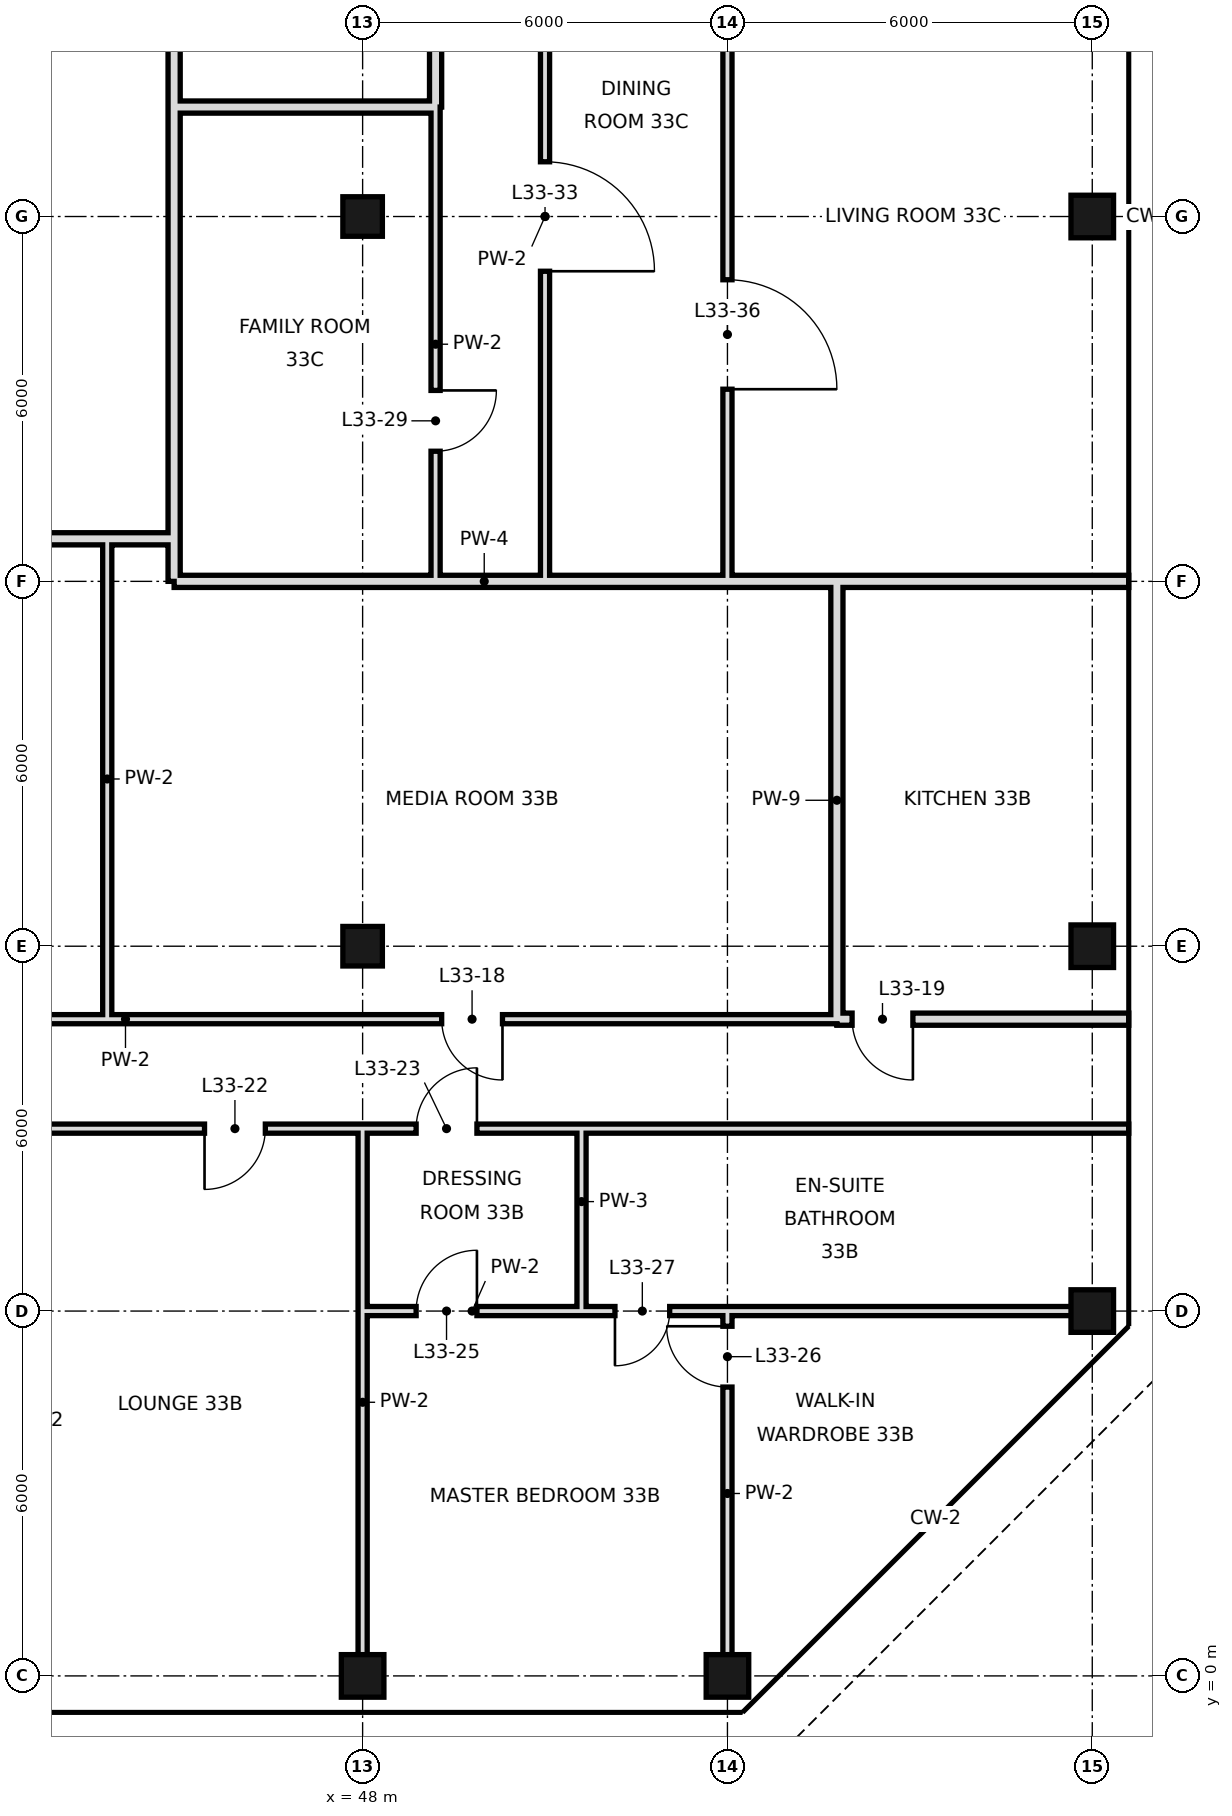
"""IFC4 building model, lengths in metres.
Left out: names, types, materials, properties, quantities, classifications, styles, units other than length and angle.
Written with IfcOpenShell. Run it as: python <this file> out.ifc"""

import sys

from ifc_helpers import new_model, si_unit, direction, frame, frame_2d, origin, origin_2d, place, context, subcontext, project, spatial, rectangle, hollow_rectangle, extrude, element, fill, save


model = new_model("IFC4")
c1 = context("Model", 3, precision=1e-05, world=origin(), true_north=direction((0.0, 1.0)))
c2 = subcontext(c1, "Body", "Model", "MODEL_VIEW")
j1 = project(units=[si_unit("LENGTHUNIT", "METRE"), si_unit("PLANEANGLEUNIT", "RADIAN")], contexts=[c1])
p1 = place(None, origin())
s1 = spatial("IfcSite", under=j1, at=p1, CompositionType="ELEMENT")
p2 = place(p1, origin())
s2 = spatial("IfcBuilding", under=s1, at=p2, CompositionType="ELEMENT")
p3 = place(p2, frame((0.0, 0.0, 147.4)))
s3 = spatial("IfcBuildingStorey", under=s2, at=p3, CompositionType="ELEMENT", Elevation=147.4)
p4 = place(p3, frame((48.0, 0.0, 0.0), z_axis=(0.0, 0.0, 1.0), x_axis=(1.0, 0.0, 0.0)))
e1 = element("IfcColumn", 1, at=p4, inside=s3, PredefinedType="COLUMN", context=c2, shape_type="SweptSolid", body=[
    extrude(hollow_rectangle(XDim=0.7, YDim=0.7, WallThickness=0.036, at=origin_2d()), origin(), (0.0, 0.0, 1.0), 3.6),
])
for number, where, z_axis, x_axis in (
    (2, (48.0, 12.0, 0.0), (0.0, 0.0, 1.0), (1.0, 0.0, 0.0)),
    (3, (48.0, 24.0, 0.0), (0.0, 0.0, 1.0), (1.0, 0.0, 0.0)),
):
    element("IfcColumn", number, at=place(p3, frame(where, z_axis=z_axis, x_axis=x_axis)), inside=s3, PredefinedType="COLUMN", context=c2, shape_type="SweptSolid", body=[
        extrude(hollow_rectangle(XDim=0.65, YDim=0.65, WallThickness=0.032, at=origin_2d()), origin(), (0.0, 0.0, 1.0), 3.6),
    ])
for number, where, z_axis, x_axis in (
    (4, (54.0, 0.0, 0.0), (0.0, 0.0, 1.0), (1.0, 0.0, 0.0)),
    (5, (60.0, 6.0, 0.0), (0.0, 0.0, 1.0), (1.0, 0.0, 0.0)),
    (6, (60.0, 12.0, 0.0), (0.0, 0.0, 1.0), (1.0, 0.0, 0.0)),
    (7, (60.0, 24.0, 0.0), (0.0, 0.0, 1.0), (1.0, 0.0, 0.0)),
):
    element("IfcColumn", number, at=place(p3, frame(where, z_axis=z_axis, x_axis=x_axis)), inside=s3, PredefinedType="COLUMN", context=c2, shape_type="SweptSolid", body=[
        extrude(hollow_rectangle(XDim=0.7, YDim=0.7, WallThickness=0.036, at=origin_2d()), origin(), (0.0, 0.0, 1.0), 3.6),
    ])
p5 = place(p3, frame((43.8, 10.8, 0.0), z_axis=(0.0, 0.0, 1.0), x_axis=(0.0, 1.0, 0.0)))
e8 = element("IfcWall", 8, at=p5, inside=s3, PredefinedType="PARTITIONING", context=c2, shape_type="SweptSolid", body=[
    extrude(rectangle(XDim=7.9, YDim=0.15, at=frame_2d((3.95, 0.0))), origin(), (0.0, 0.0, 1.0), 3.42),
])
p6 = place(p3, frame((44.9, 18.7, 0.0), z_axis=(0.0, 0.0, 1.0), x_axis=(0.0, 1.0, 0.0)))
e9 = element("IfcWall", 9, at=p6, inside=s3, PredefinedType="SOLIDWALL", context=c2, shape_type="SweptSolid", body=[
    extrude(rectangle(XDim=7.1, YDim=0.2, at=frame_2d((3.55, 0.0))), origin(), (0.0, 0.0, 1.0), 3.42),
])
p7 = place(p3, frame((44.9, 25.8, 0.0), z_axis=(0.0, 0.0, 1.0), x_axis=(0.0, 1.0, 0.0)))
e10 = element("IfcWall", 10, at=p7, inside=s3, PredefinedType="SOLIDWALL", context=c2, shape_type="SweptSolid", body=[
    extrude(rectangle(XDim=4.8, YDim=0.2, at=frame_2d((2.4, 0.0))), origin(), (0.0, 0.0, 1.0), 2.97),
])
p8 = place(p3, frame((44.9, 18.0, 0.0), z_axis=(0.0, 0.0, 1.0), x_axis=(0.0, 1.0, 0.0)))
e11 = element("IfcWall", 11, at=p8, inside=s3, PredefinedType="SOLIDWALL", context=c2, shape_type="SweptSolid", body=[
    extrude(rectangle(XDim=0.7, YDim=0.2, at=frame_2d((0.35, 0.0))), origin(), (0.0, 0.0, 1.0), 2.97),
])
p9 = place(p3, frame((48.0, 0.0, 0.0), z_axis=(0.0, 0.0, 1.0), x_axis=(0.0, 1.0, 0.0)))
e12 = element("IfcWall", 12, at=p9, inside=s3, PredefinedType="PARTITIONING", context=c2, shape_type="SweptSolid", body=[
    extrude(rectangle(XDim=9.0, YDim=0.15, at=frame_2d((4.5, 0.0))), origin(), (0.0, 0.0, 1.0), 2.72),
])
p10 = place(p3, frame((49.2, 25.8, 0.0), z_axis=(0.0, 0.0, 1.0), x_axis=(0.0, 1.0, 0.0)))
e13 = element("IfcWall", 13, at=p10, inside=s3, PredefinedType="SOLIDWALL", context=c2, shape_type="SweptSolid", body=[
    extrude(rectangle(XDim=4.8, YDim=0.2, at=frame_2d((2.4, 0.0))), origin(), (0.0, 0.0, 1.0), 2.72),
])
p11 = place(p10, frame((2.56, 0.0, 0.0)))
e14 = element("IfcOpeningElement", 14, at=p11, cuts=e13, PredefinedType="OPENING", context=c2, shape_type="SweptSolid", body=[
    extrude(rectangle(XDim=1.0, YDim=2.4, at=frame_2d((0.5, 1.2))), frame((0.0, 0.11, 0.0), z_axis=(0.0, -1.0, 0.0), x_axis=(1.0, 0.0, 0.0)), (0.0, 0.0, 1.0), 0.22),
])
p12 = place(p3, frame((49.2, 18.0, 0.0), z_axis=(0.0, 0.0, 1.0), x_axis=(0.0, 1.0, 0.0)))
e15 = element("IfcWall", 15, at=p12, inside=s3, PredefinedType="PARTITIONING", context=c2, shape_type="SweptSolid", body=[
    extrude(rectangle(XDim=7.8, YDim=0.15, at=frame_2d((3.9, 0.0))), origin(), (0.0, 0.0, 1.0), 3.42),
])
p13 = place(p12, frame((2.14, 0.0, 0.0)))
e16 = element("IfcOpeningElement", 16, at=p13, cuts=e15, PredefinedType="OPENING", context=c2, shape_type="SweptSolid", body=[
    extrude(rectangle(XDim=1.0, YDim=2.4, at=frame_2d((0.5, 1.2))), frame((0.0, 0.085, 0.0), z_axis=(0.0, -1.0, 0.0), x_axis=(1.0, 0.0, 0.0)), (0.0, 0.0, 1.0), 0.17),
])
p14 = place(p3, frame((51.0, 18.0, 0.0), z_axis=(0.0, 0.0, 1.0), x_axis=(0.0, 1.0, 0.0)))
e17 = element("IfcWall", 17, at=p14, inside=s3, PredefinedType="PARTITIONING", context=c2, shape_type="SweptSolid", body=[
    extrude(rectangle(XDim=12.0, YDim=0.15, at=frame_2d((6.0, 0.0))), origin(), (0.0, 0.0, 1.0), 3.42),
])
p15 = place(p14, frame((5.1, 0.0, 0.0)))
e18 = element("IfcOpeningElement", 18, at=p15, cuts=e17, PredefinedType="OPENING", context=c2, shape_type="SweptSolid", body=[
    extrude(rectangle(XDim=1.8, YDim=2.4, at=frame_2d((0.9, 1.2))), frame((0.0, 0.085, 0.0), z_axis=(0.0, -1.0, 0.0), x_axis=(1.0, 0.0, 0.0)), (0.0, 0.0, 1.0), 0.17),
])
p16 = place(p3, frame((51.6, 6.0, 0.0), z_axis=(0.0, 0.0, 1.0), x_axis=(0.0, 1.0, 0.0)))
e19 = element("IfcWall", 19, at=p16, inside=s3, PredefinedType="PARTITIONING", context=c2, shape_type="SweptSolid", body=[
    extrude(rectangle(XDim=3.0, YDim=0.15, at=frame_2d((1.5, 0.0))), origin(), (0.0, 0.0, 1.0), 3.42),
])
p17 = place(p3, frame((54.0, 0.0, 0.0), z_axis=(0.0, 0.0, 1.0), x_axis=(0.0, 1.0, 0.0)))
e20 = element("IfcWall", 20, at=p17, inside=s3, PredefinedType="PARTITIONING", context=c2, shape_type="SweptSolid", body=[
    extrude(rectangle(XDim=6.0, YDim=0.15, at=frame_2d((3.0, 0.0))), origin(), (0.0, 0.0, 1.0), 3.42),
])
p18 = place(p17, frame((4.75, 0.0, 0.0)))
e21 = element("IfcOpeningElement", 21, at=p18, cuts=e20, PredefinedType="OPENING", context=c2, shape_type="SweptSolid", body=[
    extrude(rectangle(XDim=1.0, YDim=2.4, at=frame_2d((0.5, 1.2))), frame((0.0, 0.085, 0.0), z_axis=(0.0, -1.0, 0.0), x_axis=(1.0, 0.0, 0.0)), (0.0, 0.0, 1.0), 0.17),
])
p19 = place(p3, frame((54.0, 18.0, 0.0), z_axis=(0.0, 0.0, 1.0), x_axis=(0.0, 1.0, 0.0)))
e22 = element("IfcWall", 22, at=p19, inside=s3, PredefinedType="PARTITIONING", context=c2, shape_type="SweptSolid", body=[
    extrude(rectangle(XDim=12.0, YDim=0.15, at=frame_2d((6.0, 0.0))), origin(), (0.0, 0.0, 1.0), 3.42),
])
p20 = place(p19, frame((3.16, 0.0, 0.0)))
e23 = element("IfcOpeningElement", 23, at=p20, cuts=e22, PredefinedType="OPENING", context=c2, shape_type="SweptSolid", body=[
    extrude(rectangle(XDim=1.8, YDim=2.4, at=frame_2d((0.9, 1.2))), frame((0.0, 0.085, 0.0), z_axis=(0.0, -1.0, 0.0), x_axis=(1.0, 0.0, 0.0)), (0.0, 0.0, 1.0), 0.17),
])
p21 = place(p3, frame((55.8, 10.8, 0.0), z_axis=(0.0, 0.0, 1.0), x_axis=(0.0, 1.0, 0.0)))
e24 = element("IfcWall", 24, at=p21, inside=s3, PredefinedType="SOLIDWALL", context=c2, shape_type="SweptSolid", body=[
    extrude(rectangle(XDim=7.2, YDim=0.2, at=frame_2d((3.6, 0.0))), origin(), (0.0, 0.0, 1.0), 2.72),
])
p22 = place(p3, frame((55.8, 10.8, 0.0), z_axis=(0.0, 0.0, 1.0), x_axis=(1.0, 0.0, 0.0)))
e25 = element("IfcWall", 25, at=p22, inside=s3, PredefinedType="SOLIDWALL", context=c2, shape_type="SweptSolid", body=[
    extrude(rectangle(XDim=4.8, YDim=0.2, at=frame_2d((2.4, 0.0))), origin(), (0.0, 0.0, 1.0), 2.97),
])
p23 = place(p22, frame((0.25, 0.0, 0.0)))
e26 = element("IfcOpeningElement", 26, at=p23, cuts=e25, PredefinedType="OPENING", context=c2, shape_type="SweptSolid", body=[
    extrude(rectangle(XDim=1.0, YDim=2.4, at=frame_2d((0.5, 1.2))), frame((0.0, 0.11, 0.0), z_axis=(0.0, -1.0, 0.0), x_axis=(1.0, 0.0, 0.0)), (0.0, 0.0, 1.0), 0.22),
])
p24 = place(p3, frame((32.4, 10.8, 0.0), z_axis=(0.0, 0.0, 1.0), x_axis=(1.0, 0.0, 0.0)))
e27 = element("IfcWall", 27, at=p24, inside=s3, PredefinedType="PARTITIONING", context=c2, shape_type="SweptSolid", body=[
    extrude(rectangle(XDim=23.4, YDim=0.15, at=frame_2d((11.7, 0.0))), origin(), (0.0, 0.0, 1.0), 3.42),
])
p25 = place(p24, frame((7.18, 0.0, 0.0)))
e28 = element("IfcOpeningElement", 28, at=p25, cuts=e27, PredefinedType="OPENING", context=c2, shape_type="SweptSolid", body=[
    extrude(rectangle(XDim=1.0, YDim=2.4, at=frame_2d((0.5, 1.2))), frame((0.0, 0.085, 0.0), z_axis=(0.0, -1.0, 0.0), x_axis=(1.0, 0.0, 0.0)), (0.0, 0.0, 1.0), 0.17),
])
p26 = place(p24, frame((16.9, 0.0, 0.0)))
e29 = element("IfcOpeningElement", 29, at=p26, cuts=e27, PredefinedType="OPENING", context=c2, shape_type="SweptSolid", body=[
    extrude(rectangle(XDim=1.0, YDim=2.4, at=frame_2d((0.5, 1.2))), frame((0.0, 0.085, 0.0), z_axis=(0.0, -1.0, 0.0), x_axis=(1.0, 0.0, 0.0)), (0.0, 0.0, 1.0), 0.17),
])
p27 = place(p3, frame((55.8, 18.0, 0.0), z_axis=(0.0, 0.0, 1.0), x_axis=(1.0, 0.0, 0.0)))
e30 = element("IfcWall", 30, at=p27, inside=s3, PredefinedType="SOLIDWALL", context=c2, shape_type="SweptSolid", body=[
    extrude(rectangle(XDim=4.8, YDim=0.2, at=frame_2d((2.4, 0.0))), origin(), (0.0, 0.0, 1.0), 2.72),
])
p28 = place(p3, frame((44.9, 18.0, 0.0), z_axis=(0.0, 0.0, 1.0), x_axis=(1.0, 0.0, 0.0)))
e31 = element("IfcWall", 31, at=p28, inside=s3, PredefinedType="SOLIDWALL", context=c2, shape_type="SweptSolid", body=[
    extrude(rectangle(XDim=10.9, YDim=0.2, at=frame_2d((5.45, 0.0))), origin(), (0.0, 0.0, 1.0), 2.72),
])
p29 = place(p3, frame((3.1, 18.7, 0.0), z_axis=(0.0, 0.0, 1.0), x_axis=(1.0, 0.0, 0.0)))
e32 = element("IfcWall", 32, at=p29, inside=s3, PredefinedType="SOLIDWALL", context=c2, shape_type="SweptSolid", body=[
    extrude(rectangle(XDim=41.8, YDim=0.2, at=frame_2d((20.9, 0.0))), origin(), (0.0, 0.0, 1.0), 2.72),
])
p30 = place(p29, frame((5.64, 0.0, 0.0)))
e33 = element("IfcOpeningElement", 33, at=p30, cuts=e32, PredefinedType="OPENING", context=c2, shape_type="SweptSolid", body=[
    extrude(rectangle(XDim=1.2, YDim=2.4, at=frame_2d((0.6, 1.2))), frame((0.0, 0.11, 0.0), z_axis=(0.0, -1.0, 0.0), x_axis=(1.0, 0.0, 0.0)), (0.0, 0.0, 1.0), 0.22),
])
p31 = place(p29, frame((24.16, 0.0, 0.0)))
e34 = element("IfcOpeningElement", 34, at=p31, cuts=e32, PredefinedType="OPENING", context=c2, shape_type="SweptSolid", body=[
    extrude(rectangle(XDim=1.2, YDim=2.4, at=frame_2d((0.6, 1.2))), frame((0.0, 0.11, 0.0), z_axis=(0.0, -1.0, 0.0), x_axis=(1.0, 0.0, 0.0)), (0.0, 0.0, 1.0), 0.22),
])
p32 = place(p3, frame((44.9, 25.8, 0.0), z_axis=(0.0, 0.0, 1.0), x_axis=(1.0, 0.0, 0.0)))
e35 = element("IfcWall", 35, at=p32, inside=s3, PredefinedType="SOLIDWALL", context=c2, shape_type="SweptSolid", body=[
    extrude(rectangle(XDim=4.3, YDim=0.2, at=frame_2d((2.15, 0.0))), origin(), (0.0, 0.0, 1.0), 2.97),
])
p33 = place(p3, frame((48.0, 6.0, 0.0), z_axis=(0.0, 0.0, 1.0), x_axis=(1.0, 0.0, 0.0)))
e36 = element("IfcWall", 36, at=p33, inside=s3, PredefinedType="PARTITIONING", context=c2, shape_type="SweptSolid", body=[
    extrude(rectangle(XDim=3.6, YDim=0.15, at=frame_2d((1.8, 0.0))), origin(), (0.0, 0.0, 1.0), 2.72),
])
p34 = place(p33, frame((0.88, 0.0, 0.0)))
e37 = element("IfcOpeningElement", 37, at=p34, cuts=e36, PredefinedType="OPENING", context=c2, shape_type="SweptSolid", body=[
    extrude(rectangle(XDim=1.0, YDim=2.4, at=frame_2d((0.5, 1.2))), frame((0.0, 0.085, 0.0), z_axis=(0.0, -1.0, 0.0), x_axis=(1.0, 0.0, 0.0)), (0.0, 0.0, 1.0), 0.17),
])
p35 = place(p3, frame((51.6, 6.0, 0.0), z_axis=(0.0, 0.0, 1.0), x_axis=(1.0, 0.0, 0.0)))
e38 = element("IfcWall", 38, at=p35, inside=s3, PredefinedType="PARTITIONING", context=c2, shape_type="SweptSolid", body=[
    extrude(rectangle(XDim=8.4, YDim=0.15, at=frame_2d((4.2, 0.0))), origin(), (0.0, 0.0, 1.0), 2.72),
])
p36 = place(p35, frame((0.55, 0.0, 0.0)))
e39 = element("IfcOpeningElement", 39, at=p36, cuts=e38, PredefinedType="OPENING", context=c2, shape_type="SweptSolid", body=[
    extrude(rectangle(XDim=0.9, YDim=2.4, at=frame_2d((0.45, 1.2))), frame((0.0, 0.085, 0.0), z_axis=(0.0, -1.0, 0.0), x_axis=(1.0, 0.0, 0.0)), (0.0, 0.0, 1.0), 0.17),
])
p37 = place(p3, frame((24.0, 9.0, 0.0), z_axis=(0.0, 0.0, 1.0), x_axis=(1.0, 0.0, 0.0)))
e40 = element("IfcWall", 40, at=p37, inside=s3, PredefinedType="PARTITIONING", context=c2, shape_type="SweptSolid", body=[
    extrude(rectangle(XDim=27.6, YDim=0.15, at=frame_2d((13.8, 0.0))), origin(), (0.0, 0.0, 1.0), 3.42),
])
p38 = place(p37, frame((3.16, 0.0, 0.0)))
e41 = element("IfcOpeningElement", 41, at=p38, cuts=e40, PredefinedType="OPENING", context=c2, shape_type="SweptSolid", body=[
    extrude(rectangle(XDim=1.8, YDim=2.4, at=frame_2d((0.9, 1.2))), frame((0.0, 0.085, 0.0), z_axis=(0.0, -1.0, 0.0), x_axis=(1.0, 0.0, 0.0)), (0.0, 0.0, 1.0), 0.17),
])
p39 = place(p37, frame((13.6, 0.0, 0.0)))
e42 = element("IfcOpeningElement", 42, at=p39, cuts=e40, PredefinedType="OPENING", context=c2, shape_type="SweptSolid", body=[
    extrude(rectangle(XDim=1.0, YDim=2.4, at=frame_2d((0.5, 1.2))), frame((0.0, 0.085, 0.0), z_axis=(0.0, -1.0, 0.0), x_axis=(1.0, 0.0, 0.0)), (0.0, 0.0, 1.0), 0.17),
])
p40 = place(p37, frame((21.4, 0.0, 0.0)))
e43 = element("IfcOpeningElement", 43, at=p40, cuts=e40, PredefinedType="OPENING", context=c2, shape_type="SweptSolid", body=[
    extrude(rectangle(XDim=1.0, YDim=2.4, at=frame_2d((0.5, 1.2))), frame((0.0, 0.085, 0.0), z_axis=(0.0, -1.0, 0.0), x_axis=(1.0, 0.0, 0.0)), (0.0, 0.0, 1.0), 0.17),
])
p41 = place(p37, frame((24.88, 0.0, 0.0)))
e44 = element("IfcOpeningElement", 44, at=p41, cuts=e40, PredefinedType="OPENING", context=c2, shape_type="SweptSolid", body=[
    extrude(rectangle(XDim=1.0, YDim=2.4, at=frame_2d((0.5, 1.2))), frame((0.0, 0.085, 0.0), z_axis=(0.0, -1.0, 0.0), x_axis=(1.0, 0.0, 0.0)), (0.0, 0.0, 1.0), 0.17),
])
p42 = place(p3, frame((51.6, 9.0, 0.0), z_axis=(0.0, 0.0, 1.0), x_axis=(1.0, 0.0, 0.0)))
e45 = element("IfcWall", 45, at=p42, inside=s3, PredefinedType="PARTITIONING", context=c2, shape_type="SweptSolid", body=[
    extrude(rectangle(XDim=9.0, YDim=0.15, at=frame_2d((4.5, 0.0))), origin(), (0.0, 0.0, 1.0), 3.42),
])
p43 = place(p26, origin())
e46 = element("IfcDoor", 46, at=p43, inside=s3, OperationType="SINGLE_SWING_RIGHT", PredefinedType="DOOR", context=c2, shape_type="SweptSolid", body=[
    extrude(rectangle(XDim=1.0, YDim=2.4, at=frame_2d((0.5, 1.2))), frame((0.0, 0.025, 0.0), z_axis=(0.0, -1.0, 0.0), x_axis=(1.0, 0.0, 0.0)), (0.0, 0.0, 1.0), 0.05),
])
fill(e29, e46)
p44 = place(p23, origin())
e47 = element("IfcDoor", 47, at=p44, inside=s3, OperationType="SINGLE_SWING_RIGHT", PredefinedType="DOOR", context=c2, shape_type="SweptSolid", body=[
    extrude(rectangle(XDim=1.0, YDim=2.4, at=frame_2d((0.5, 1.2))), frame((0.0, 0.025, 0.0), z_axis=(0.0, -1.0, 0.0), x_axis=(1.0, 0.0, 0.0)), (0.0, 0.0, 1.0), 0.05),
])
fill(e26, e47)
p45 = place(p40, frame((1.0, 0.0, 0.0), z_axis=(0.0, 0.0, 1.0), x_axis=(-1.0, 0.0, 0.0)))
e48 = element("IfcDoor", 48, at=p45, inside=s3, OperationType="SINGLE_SWING_RIGHT", PredefinedType="DOOR", context=c2, shape_type="SweptSolid", body=[
    extrude(rectangle(XDim=1.0, YDim=2.4, at=frame_2d((0.5, 1.2))), frame((0.0, 0.025, 0.0), z_axis=(0.0, -1.0, 0.0), x_axis=(1.0, 0.0, 0.0)), (0.0, 0.0, 1.0), 0.05),
])
fill(e43, e48)
p46 = place(p41, frame((1.0, 0.0, 0.0), z_axis=(0.0, 0.0, 1.0), x_axis=(-1.0, 0.0, 0.0)))
e49 = element("IfcDoor", 49, at=p46, inside=s3, OperationType="SINGLE_SWING_LEFT", PredefinedType="DOOR", context=c2, shape_type="SweptSolid", body=[
    extrude(rectangle(XDim=1.0, YDim=2.4, at=frame_2d((0.5, 1.2))), frame((0.0, 0.025, 0.0), z_axis=(0.0, -1.0, 0.0), x_axis=(1.0, 0.0, 0.0)), (0.0, 0.0, 1.0), 0.05),
])
fill(e44, e49)
p47 = place(p34, frame((1.0, 0.0, 0.0), z_axis=(0.0, 0.0, 1.0), x_axis=(-1.0, 0.0, 0.0)))
e50 = element("IfcDoor", 50, at=p47, inside=s3, OperationType="SINGLE_SWING_LEFT", PredefinedType="DOOR", context=c2, shape_type="SweptSolid", body=[
    extrude(rectangle(XDim=1.0, YDim=2.4, at=frame_2d((0.5, 1.2))), frame((0.0, 0.025, 0.0), z_axis=(0.0, -1.0, 0.0), x_axis=(1.0, 0.0, 0.0)), (0.0, 0.0, 1.0), 0.05),
])
fill(e37, e50)
p48 = place(p18, frame((1.0, 0.0, 0.0), z_axis=(0.0, 0.0, 1.0), x_axis=(-1.0, 0.0, 0.0)))
e51 = element("IfcDoor", 51, at=p48, inside=s3, OperationType="SINGLE_SWING_LEFT", PredefinedType="DOOR", context=c2, shape_type="SweptSolid", body=[
    extrude(rectangle(XDim=1.0, YDim=2.4, at=frame_2d((0.5, 1.2))), frame((0.0, 0.025, 0.0), z_axis=(0.0, -1.0, 0.0), x_axis=(1.0, 0.0, 0.0)), (0.0, 0.0, 1.0), 0.05),
])
fill(e21, e51)
p49 = place(p36, frame((0.9, 0.0, 0.0), z_axis=(0.0, 0.0, 1.0), x_axis=(-1.0, 0.0, 0.0)))
e52 = element("IfcDoor", 52, at=p49, inside=s3, OperationType="SINGLE_SWING_RIGHT", PredefinedType="DOOR", context=c2, shape_type="SweptSolid", body=[
    extrude(rectangle(XDim=0.9, YDim=2.4, at=frame_2d((0.45, 1.2))), frame((0.0, 0.025, 0.0), z_axis=(0.0, -1.0, 0.0), x_axis=(1.0, 0.0, 0.0)), (0.0, 0.0, 1.0), 0.05),
])
fill(e39, e52)
p50 = place(p13, origin())
e53 = element("IfcDoor", 53, at=p50, inside=s3, OperationType="SINGLE_SWING_RIGHT", PredefinedType="DOOR", context=c2, shape_type="SweptSolid", body=[
    extrude(rectangle(XDim=1.0, YDim=2.4, at=frame_2d((0.5, 1.2))), frame((0.0, 0.025, 0.0), z_axis=(0.0, -1.0, 0.0), x_axis=(1.0, 0.0, 0.0)), (0.0, 0.0, 1.0), 0.05),
])
fill(e16, e53)
p51 = place(p15, frame((1.8, 0.0, 0.0), z_axis=(0.0, 0.0, 1.0), x_axis=(-1.0, 0.0, 0.0)))
e54 = element("IfcDoor", 54, at=p51, inside=s3, OperationType="SINGLE_SWING_RIGHT", PredefinedType="DOOR", context=c2, shape_type="SweptSolid", body=[
    extrude(rectangle(XDim=1.8, YDim=2.4, at=frame_2d((0.9, 1.2))), frame((0.0, 0.025, 0.0), z_axis=(0.0, -1.0, 0.0), x_axis=(1.0, 0.0, 0.0)), (0.0, 0.0, 1.0), 0.05),
])
fill(e18, e54)
p52 = place(p20, frame((1.8, 0.0, 0.0), z_axis=(0.0, 0.0, 1.0), x_axis=(-1.0, 0.0, 0.0)))
e55 = element("IfcDoor", 55, at=p52, inside=s3, OperationType="SINGLE_SWING_RIGHT", PredefinedType="DOOR", context=c2, shape_type="SweptSolid", body=[
    extrude(rectangle(XDim=1.8, YDim=2.4, at=frame_2d((0.9, 1.2))), frame((0.0, 0.025, 0.0), z_axis=(0.0, -1.0, 0.0), x_axis=(1.0, 0.0, 0.0)), (0.0, 0.0, 1.0), 0.05),
])
fill(e23, e55)
save(model, sys.argv[1])
